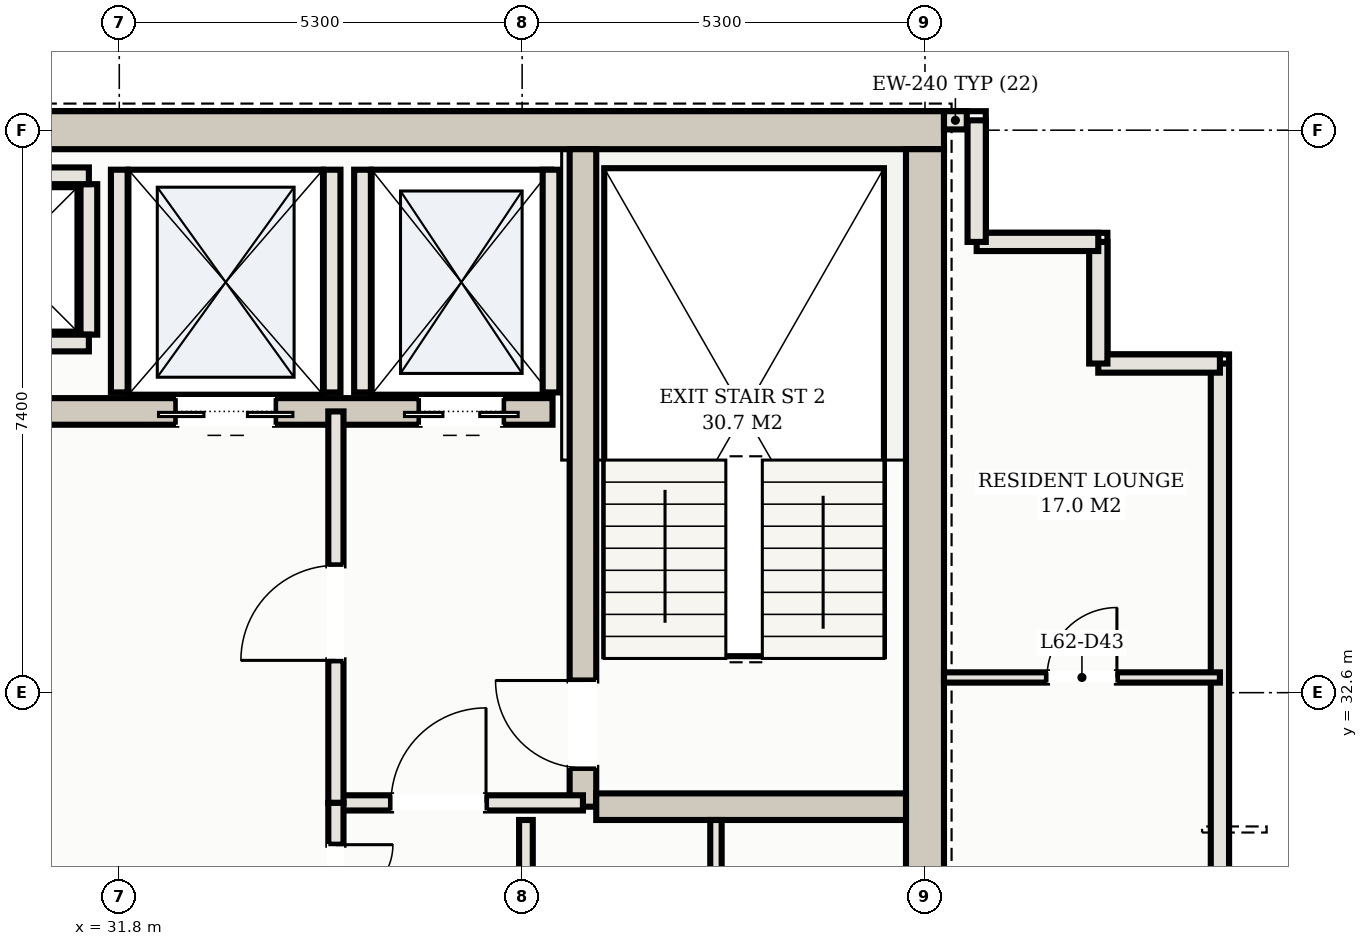
"""IFC4 building model, lengths in metres.
Left out: names, types, materials, properties, quantities, classifications, styles, units other than length and angle.
Written with IfcOpenShell. Run it as: python <this file> out.ifc"""

import sys

from ifc_helpers import new_model, si_unit, direction, frame, frame_2d, origin, place, context, subcontext, project, spatial, rectangle, extrude, element, fill, save


model = new_model("IFC4")
c1 = context("Model", 3, precision=1e-05, world=origin(), true_north=direction((0.0, 1.0)))
c2 = subcontext(c1, "Body", "Model", "MODEL_VIEW")
j1 = project(units=[si_unit("LENGTHUNIT", "METRE"), si_unit("PLANEANGLEUNIT", "RADIAN")], contexts=[c1])
p1 = place(None, origin())
s1 = spatial("IfcSite", under=j1, at=p1, CompositionType="ELEMENT")
p2 = place(p1, origin())
s2 = spatial("IfcBuilding", under=s1, at=p2, CompositionType="ELEMENT")
p3 = place(p2, frame((0.0, 0.0, 226.4)))
s3 = spatial("IfcBuildingStorey", under=s2, at=p3, CompositionType="ELEMENT", Elevation=226.4)
p4 = place(p3, frame((10.35, 40.0, 0.0), z_axis=(0.0, 0.0, 1.0), x_axis=(1.0, 0.0, 0.0)))
e1 = element("IfcWall", 1, at=p4, inside=s3, PredefinedType="SHEAR", context=c2, shape_type="SweptSolid", body=[
    extrude(rectangle(XDim=32.3, YDim=0.5, at=frame_2d((16.15, 0.0))), origin(), (0.0, 0.0, 1.0), 3.11),
])
p5 = place(p3, frame((42.4, 25.45, 0.0), z_axis=(0.0, 0.0, 1.0), x_axis=(0.0, 1.0, 0.0)))
e2 = element("IfcWall", 2, at=p5, inside=s3, PredefinedType="SHEAR", context=c2, shape_type="SweptSolid", body=[
    extrude(rectangle(XDim=14.3, YDim=0.5, at=frame_2d((7.15, 0.0))), origin(), (0.0, 0.0, 1.0), 3.11),
])
p6 = place(p3, frame((37.9, 31.1, 0.0), z_axis=(0.0, 0.0, 1.0), x_axis=(0.0, 1.0, 0.0)))
e3 = element("IfcWall", 3, at=p6, inside=s3, PredefinedType="SHEAR", context=c2, shape_type="SweptSolid", body=[
    extrude(rectangle(XDim=8.65, YDim=0.35, at=frame_2d((4.325, 0.0))), origin(), (0.0, 0.0, 1.0), 3.11),
])
p7 = place(p6, frame((0.51, 0.0, 0.0)))
e4 = element("IfcOpeningElement", 4, at=p7, cuts=e3, PredefinedType="OPENING", context=c2, shape_type="SweptSolid", body=[
    extrude(rectangle(XDim=1.15, YDim=2.2, at=frame_2d((0.575, 1.1))), frame((0.0, 0.185, 0.0), z_axis=(0.0, -1.0, 0.0), x_axis=(1.0, 0.0, 0.0)), (0.0, 0.0, 1.0), 0.37),
])
p8 = place(p3, frame((38.075, 31.1, 0.0), z_axis=(0.0, 0.0, 1.0), x_axis=(1.0, 0.0, 0.0)))
e5 = element("IfcWall", 5, at=p8, inside=s3, PredefinedType="SHEAR", context=c2, shape_type="SweptSolid", body=[
    extrude(rectangle(XDim=4.075, YDim=0.35, at=frame_2d((2.038, 0.0))), origin(), (0.0, 0.0, 1.0), 3.11),
])
p9 = place(p3, frame((15.5, 36.3, 0.0), z_axis=(0.0, 0.0, 1.0), x_axis=(1.0, 0.0, 0.0)))
e6 = element("IfcWall", 6, at=p9, inside=s3, PredefinedType="SHEAR", context=c2, shape_type="SweptSolid", body=[
    extrude(rectangle(XDim=22.0, YDim=0.35, at=frame_2d((11.0, 0.0))), origin(), (0.0, 0.0, 1.0), 3.11),
])
p10 = place(p9, frame((0.65, 0.0, 0.0)))
e7 = element("IfcOpeningElement", 7, at=p10, cuts=e6, PredefinedType="OPENING", context=c2, shape_type="SweptSolid", body=[
    extrude(rectangle(XDim=1.1, YDim=2.15, at=frame_2d((0.55, 1.075))), frame((0.0, 0.185, 0.0), z_axis=(0.0, -1.0, 0.0), x_axis=(1.0, 0.0, 0.0)), (0.0, 0.0, 1.0), 0.37),
])
p11 = place(p9, frame((20.25, 0.0, 0.0)))
e8 = element("IfcOpeningElement", 8, at=p11, cuts=e6, PredefinedType="OPENING", context=c2, shape_type="SweptSolid", body=[
    extrude(rectangle(XDim=1.1, YDim=2.15, at=frame_2d((0.55, 1.075))), frame((0.0, 0.185, 0.0), z_axis=(0.0, -1.0, 0.0), x_axis=(1.0, 0.0, 0.0)), (0.0, 0.0, 1.0), 0.37),
])
p12 = place(p9, frame((17.05, 0.0, 0.0)))
e9 = element("IfcOpeningElement", 9, at=p12, cuts=e6, PredefinedType="OPENING", context=c2, shape_type="SweptSolid", body=[
    extrude(rectangle(XDim=1.3, YDim=2.2, at=frame_2d((0.65, 1.1))), frame((0.0, 0.185, 0.0), z_axis=(0.0, -1.0, 0.0), x_axis=(1.0, 0.0, 0.0)), (0.0, 0.0, 1.0), 0.37),
])
p13 = place(p9, frame((3.95, 0.0, 0.0)))
e10 = element("IfcOpeningElement", 10, at=p13, cuts=e6, PredefinedType="OPENING", context=c2, shape_type="SweptSolid", body=[
    extrude(rectangle(XDim=1.1, YDim=2.15, at=frame_2d((0.55, 1.075))), frame((0.0, 0.185, 0.0), z_axis=(0.0, -1.0, 0.0), x_axis=(1.0, 0.0, 0.0)), (0.0, 0.0, 1.0), 0.37),
])
p14 = place(p9, frame((6.55, 0.0, 0.0)))
e11 = element("IfcOpeningElement", 11, at=p14, cuts=e6, PredefinedType="OPENING", context=c2, shape_type="SweptSolid", body=[
    extrude(rectangle(XDim=1.1, YDim=2.15, at=frame_2d((0.55, 1.075))), frame((0.0, 0.185, 0.0), z_axis=(0.0, -1.0, 0.0), x_axis=(1.0, 0.0, 0.0)), (0.0, 0.0, 1.0), 0.37),
])
p15 = place(p9, frame((9.15, 0.0, 0.0)))
e12 = element("IfcOpeningElement", 12, at=p15, cuts=e6, PredefinedType="OPENING", context=c2, shape_type="SweptSolid", body=[
    extrude(rectangle(XDim=1.1, YDim=2.15, at=frame_2d((0.55, 1.075))), frame((0.0, 0.185, 0.0), z_axis=(0.0, -1.0, 0.0), x_axis=(1.0, 0.0, 0.0)), (0.0, 0.0, 1.0), 0.37),
])
for number, where, z_axis, x_axis in (
    (13, (35.0, 36.55, 0.0), (0.0, 0.0, 1.0), (0.0, 1.0, 0.0)),
    (14, (37.48, 36.55, 0.0), (0.0, 0.0, 1.0), (0.0, 1.0, 0.0)),
    (15, (31.8, 36.55, 0.0), (0.0, 0.0, 1.0), (0.0, 1.0, 0.0)),
    (16, (34.6, 36.55, 0.0), (0.0, 0.0, 1.0), (0.0, 1.0, 0.0)),
):
    element("IfcWall", number, at=place(p3, frame(where, z_axis=z_axis, x_axis=x_axis)), inside=s3, PredefinedType="SOLIDWALL", context=c2, shape_type="SweptSolid", body=[
        extrude(rectangle(XDim=2.93, YDim=0.22, at=frame_2d((1.465, 0.0))), origin(), (0.0, 0.0, 1.0), 3.11),
    ])
p16 = place(p3, frame((31.4, 37.31, 0.0), z_axis=(0.0, 0.0, 1.0), x_axis=(0.0, 1.0, 0.0)))
e17 = element("IfcWall", 17, at=p16, inside=s3, PredefinedType="SOLIDWALL", context=c2, shape_type="SweptSolid", body=[
    extrude(rectangle(XDim=1.98, YDim=0.22, at=frame_2d((0.99, 0.0))), origin(), (0.0, 0.0, 1.0), 3.11),
])
for number, where, z_axis, x_axis in (
    (18, (29.2, 39.4, 0.0), (0.0, 0.0, 1.0), (1.0, 0.0, 0.0)),
    (19, (29.2, 37.2, 0.0), (0.0, 0.0, 1.0), (1.0, 0.0, 0.0)),
):
    element("IfcWall", number, at=place(p3, frame(where, z_axis=z_axis, x_axis=x_axis)), inside=s3, PredefinedType="SOLIDWALL", context=c2, shape_type="SweptSolid", body=[
        extrude(rectangle(XDim=2.2, YDim=0.22, at=frame_2d((1.1, 0.0))), origin(), (0.0, 0.0, 1.0), 3.11),
    ])
p17 = place(p3, frame((46.28, 10.52, 0.0), z_axis=(0.0, 0.0, 1.0), x_axis=(0.0, 1.0, 0.0)))
e20 = element("IfcWall", 20, at=p17, inside=s3, PredefinedType="SOLIDWALL", context=c2, shape_type="SweptSolid", body=[
    extrude(rectangle(XDim=26.41, YDim=0.24, at=frame_2d((13.205, 0.0))), origin(), (0.0, 0.0, 1.0), 3.11),
])
p18 = place(p17, frame((6.48, 0.0, 0.0)))
e21 = element("IfcOpeningElement", 21, at=p18, cuts=e20, PredefinedType="OPENING", context=c2, shape_type="SweptSolid", body=[
    extrude(rectangle(XDim=1.8, YDim=2.2, at=frame_2d((0.9, 1.1))), frame((0.0, 0.13, 0.0), z_axis=(0.0, -1.0, 0.0), x_axis=(1.0, 0.0, 0.0)), (0.0, 0.0, 1.0), 0.26),
])
for number, where, z_axis, x_axis in (
    (22, (46.28, 36.93, 0.0), (0.0, 0.0, 1.0), (-1.0, 0.0, 0.0)),
    (23, (44.68, 36.93, 0.0), (0.0, 0.0, 1.0), (0.0, 1.0, 0.0)),
):
    element("IfcWall", number, at=place(p3, frame(where, z_axis=z_axis, x_axis=x_axis)), inside=s3, PredefinedType="SOLIDWALL", context=c2, shape_type="SweptSolid", body=[
        extrude(rectangle(XDim=1.6, YDim=0.24, at=frame_2d((0.8, 0.0))), origin(), (0.0, 0.0, 1.0), 3.11),
    ])
for number, where, z_axis, x_axis in (
    (24, (44.68, 38.53, 0.0), (0.0, 0.0, 1.0), (-1.0, 0.0, 0.0)),
    (25, (43.08, 38.53, 0.0), (0.0, 0.0, 1.0), (0.0, 1.0, 0.0)),
):
    element("IfcWall", number, at=place(p3, frame(where, z_axis=z_axis, x_axis=x_axis)), inside=s3, PredefinedType="SOLIDWALL", context=c2, shape_type="SweptSolid", body=[
        extrude(rectangle(XDim=1.6, YDim=0.24, at=frame_2d((0.8, 0.0))), origin(), (0.0, 0.0, 1.0), 3.11),
    ])
p19 = place(p3, frame((42.95, 40.13, 0.0), z_axis=(0.0, 0.0, 1.0), x_axis=(-1.0, 0.0, 0.0)))
e26 = element("IfcWall", 26, at=p19, inside=s3, PredefinedType="SOLIDWALL", context=c2, shape_type="SweptSolid", body=[
    extrude(rectangle(XDim=0.3, YDim=0.24, at=frame_2d((0.15, 0.0))), origin(), (0.0, 0.0, 1.0), 3.11),
])
p20 = place(p3, frame((34.65, 31.15, 0.0), z_axis=(0.0, 0.0, 1.0), x_axis=(1.0, 0.0, 0.0)))
e27 = element("IfcWall", 27, at=p20, inside=s3, PredefinedType="PARTITIONING", context=c2, shape_type="SweptSolid", body=[
    extrude(rectangle(XDim=3.25, YDim=0.2, at=frame_2d((1.625, 0.0))), origin(), (0.0, 0.0, 1.0), 2.43),
])
p21 = place(p20, frame((0.725, 0.0, 0.0)))
e28 = element("IfcOpeningElement", 28, at=p21, cuts=e27, PredefinedType="OPENING", context=c2, shape_type="SweptSolid", body=[
    extrude(rectangle(XDim=1.25, YDim=2.2, at=frame_2d((0.625, 1.1))), frame((0.0, 0.11, 0.0), z_axis=(0.0, -1.0, 0.0), x_axis=(1.0, 0.0, 0.0)), (0.0, 0.0, 1.0), 0.22),
])
p22 = place(p3, frame((34.65, 31.15, 0.0), z_axis=(0.0, 0.0, 1.0), x_axis=(0.0, 1.0, 0.0)))
e29 = element("IfcWall", 29, at=p22, inside=s3, PredefinedType="PARTITIONING", context=c2, shape_type="SweptSolid", body=[
    extrude(rectangle(XDim=5.15, YDim=0.2, at=frame_2d((2.575, 0.0))), origin(), (0.0, 0.0, 1.0), 2.43),
])
p23 = place(p22, frame((1.875, 0.0, 0.0)))
e30 = element("IfcOpeningElement", 30, at=p23, cuts=e29, PredefinedType="OPENING", context=c2, shape_type="SweptSolid", body=[
    extrude(rectangle(XDim=1.25, YDim=2.2, at=frame_2d((0.625, 1.1))), frame((0.0, 0.11, 0.0), z_axis=(0.0, -1.0, 0.0), x_axis=(1.0, 0.0, 0.0)), (0.0, 0.0, 1.0), 0.22),
])
p24 = place(p3, frame((37.15, 25.45, 0.0), z_axis=(0.0, 0.0, 1.0), x_axis=(0.0, 1.0, 0.0)))
e31 = element("IfcWall", 31, at=p24, inside=s3, PredefinedType="PARTITIONING", context=c2, shape_type="SweptSolid", body=[
    extrude(rectangle(XDim=5.475, YDim=0.18, at=frame_2d((2.738, 0.0))), origin(), (0.0, 0.0, 1.0), 2.43),
])
p25 = place(p24, frame((0.765, 0.0, 0.0)))
e32 = element("IfcOpeningElement", 32, at=p25, cuts=e31, PredefinedType="OPENING", context=c2, shape_type="SweptSolid", body=[
    extrude(rectangle(XDim=0.92, YDim=2.15, at=frame_2d((0.46, 1.075))), frame((0.0, 0.1, 0.0), z_axis=(0.0, -1.0, 0.0), x_axis=(1.0, 0.0, 0.0)), (0.0, 0.0, 1.0), 0.2),
])
p26 = place(p24, frame((3.452, 0.0, 0.0)))
e33 = element("IfcOpeningElement", 33, at=p26, cuts=e31, PredefinedType="OPENING", context=c2, shape_type="SweptSolid", body=[
    extrude(rectangle(XDim=0.92, YDim=2.15, at=frame_2d((0.46, 1.075))), frame((0.0, 0.1, 0.0), z_axis=(0.0, -1.0, 0.0), x_axis=(1.0, 0.0, 0.0)), (0.0, 0.0, 1.0), 0.2),
])
p27 = place(p3, frame((39.65, 27.85, 0.0), z_axis=(0.0, 0.0, 1.0), x_axis=(0.0, 1.0, 0.0)))
e34 = element("IfcWall", 34, at=p27, inside=s3, PredefinedType="PARTITIONING", context=c2, shape_type="SweptSolid", body=[
    extrude(rectangle(XDim=3.075, YDim=0.15, at=frame_2d((1.538, 0.0))), origin(), (0.0, 0.0, 1.0), 2.43),
])
p28 = place(p27, frame((1.078, 0.0, 0.0)))
e35 = element("IfcOpeningElement", 35, at=p28, cuts=e34, PredefinedType="OPENING", context=c2, shape_type="SweptSolid", body=[
    extrude(rectangle(XDim=0.92, YDim=2.15, at=frame_2d((0.46, 1.075))), frame((0.0, 0.085, 0.0), z_axis=(0.0, -1.0, 0.0), x_axis=(1.0, 0.0, 0.0)), (0.0, 0.0, 1.0), 0.17),
])
p29 = place(p3, frame((34.65, 28.55, 0.0), z_axis=(0.0, 0.0, 1.0), x_axis=(0.0, 1.0, 0.0)))
e36 = element("IfcWall", 36, at=p29, inside=s3, PredefinedType="PARTITIONING", context=c2, shape_type="SweptSolid", body=[
    extrude(rectangle(XDim=2.6, YDim=0.2, at=frame_2d((1.3, 0.0))), origin(), (0.0, 0.0, 1.0), 2.43),
])
p30 = place(p29, frame((0.55, 0.0, 0.0)))
e37 = element("IfcOpeningElement", 37, at=p30, cuts=e36, PredefinedType="OPENING", context=c2, shape_type="SweptSolid", body=[
    extrude(rectangle(XDim=1.5, YDim=2.25, at=frame_2d((0.75, 1.125))), frame((0.0, 0.11, 0.0), z_axis=(0.0, -1.0, 0.0), x_axis=(1.0, 0.0, 0.0)), (0.0, 0.0, 1.0), 0.22),
])
p31 = place(p3, frame((42.65, 32.8, 0.0), z_axis=(0.0, 0.0, 1.0), x_axis=(1.0, 0.0, 0.0)))
e38 = element("IfcWall", 38, at=p31, inside=s3, PredefinedType="PARTITIONING", context=c2, shape_type="SweptSolid", body=[
    extrude(rectangle(XDim=3.63, YDim=0.135, at=frame_2d((1.815, 0.0))), origin(), (0.0, 0.0, 1.0), 2.43),
])
p32 = place(p31, frame((1.355, 0.0, 0.0)))
e39 = element("IfcOpeningElement", 39, at=p32, cuts=e38, PredefinedType="OPENING", context=c2, shape_type="SweptSolid", body=[
    extrude(rectangle(XDim=0.92, YDim=2.15, at=frame_2d((0.46, 1.075))), frame((0.0, 0.078, 0.0), z_axis=(0.0, -1.0, 0.0), x_axis=(1.0, 0.0, 0.0)), (0.0, 0.0, 1.0), 0.155),
])
p33 = place(p11, frame((1.1, 0.0, 0.0), z_axis=(0.0, 0.0, 1.0), x_axis=(-1.0, 0.0, 0.0)))
e40 = element("IfcDoor", 40, at=p33, inside=s3, OperationType="DOUBLE_DOOR_SLIDING", PredefinedType="DOOR", context=c2, shape_type="SweptSolid", body=[
    extrude(rectangle(XDim=1.1, YDim=2.15, at=frame_2d((0.55, 1.075))), frame((0.0, 0.025, 0.0), z_axis=(0.0, -1.0, 0.0), x_axis=(1.0, 0.0, 0.0)), (0.0, 0.0, 1.0), 0.05),
])
fill(e8, e40)
p34 = place(p12, frame((1.3, 0.0, 0.0), z_axis=(0.0, 0.0, 1.0), x_axis=(-1.0, 0.0, 0.0)))
e41 = element("IfcDoor", 41, at=p34, inside=s3, OperationType="DOUBLE_DOOR_SLIDING", PredefinedType="DOOR", context=c2, shape_type="SweptSolid", body=[
    extrude(rectangle(XDim=1.3, YDim=2.2, at=frame_2d((0.65, 1.1))), frame((0.0, 0.025, 0.0), z_axis=(0.0, -1.0, 0.0), x_axis=(1.0, 0.0, 0.0)), (0.0, 0.0, 1.0), 0.05),
])
fill(e9, e41)
p35 = place(p21, origin())
e42 = element("IfcDoor", 42, at=p35, inside=s3, OperationType="SINGLE_SWING_RIGHT", PredefinedType="DOOR", context=c2, shape_type="SweptSolid", body=[
    extrude(rectangle(XDim=1.25, YDim=2.2, at=frame_2d((0.625, 1.1))), frame((0.0, 0.025, 0.0), z_axis=(0.0, -1.0, 0.0), x_axis=(1.0, 0.0, 0.0)), (0.0, 0.0, 1.0), 0.05),
])
fill(e28, e42)
p36 = place(p23, origin())
e43 = element("IfcDoor", 43, at=p36, inside=s3, OperationType="SINGLE_SWING_LEFT", PredefinedType="DOOR", context=c2, shape_type="SweptSolid", body=[
    extrude(rectangle(XDim=1.25, YDim=2.2, at=frame_2d((0.625, 1.1))), frame((0.0, 0.025, 0.0), z_axis=(0.0, -1.0, 0.0), x_axis=(1.0, 0.0, 0.0)), (0.0, 0.0, 1.0), 0.05),
])
fill(e30, e43)
p37 = place(p7, origin())
e44 = element("IfcDoor", 44, at=p37, inside=s3, OperationType="SINGLE_SWING_RIGHT", PredefinedType="DOOR", context=c2, shape_type="SweptSolid", body=[
    extrude(rectangle(XDim=1.15, YDim=2.2, at=frame_2d((0.575, 1.1))), frame((0.0, 0.025, 0.0), z_axis=(0.0, -1.0, 0.0), x_axis=(1.0, 0.0, 0.0)), (0.0, 0.0, 1.0), 0.05),
])
fill(e4, e44)
p38 = place(p30, frame((1.5, 0.0, 0.0), z_axis=(0.0, 0.0, 1.0), x_axis=(-1.0, 0.0, 0.0)))
e45 = element("IfcDoor", 45, at=p38, inside=s3, OperationType="DOUBLE_DOOR_SINGLE_SWING", PredefinedType="DOOR", context=c2, shape_type="SweptSolid", body=[
    extrude(rectangle(XDim=1.5, YDim=2.25, at=frame_2d((0.75, 1.125))), frame((0.0, 0.025, 0.0), z_axis=(0.0, -1.0, 0.0), x_axis=(1.0, 0.0, 0.0)), (0.0, 0.0, 1.0), 0.05),
])
fill(e37, e45)
p39 = place(p32, origin())
e46 = element("IfcDoor", 46, at=p39, inside=s3, OperationType="SINGLE_SWING_RIGHT", PredefinedType="DOOR", context=c2, shape_type="SweptSolid", body=[
    extrude(rectangle(XDim=0.92, YDim=2.15, at=frame_2d((0.46, 1.075))), frame((0.0, 0.025, 0.0), z_axis=(0.0, -1.0, 0.0), x_axis=(1.0, 0.0, 0.0)), (0.0, 0.0, 1.0), 0.05),
])
fill(e39, e46)
save(model, sys.argv[1])
